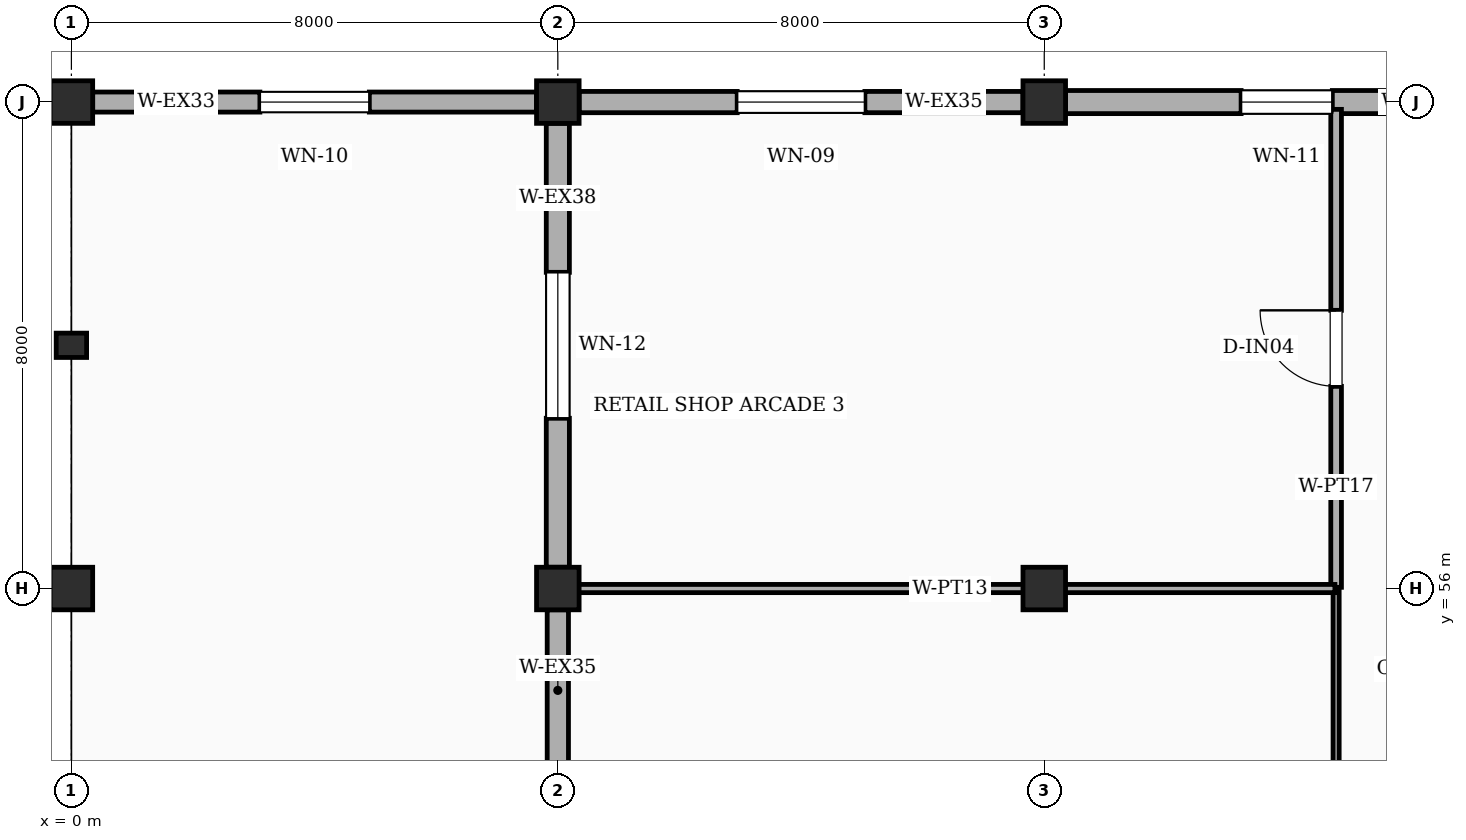
"""IFC4 building model, lengths in metres.
Left out: names, types, materials, properties, quantities, classifications, styles, units other than length and angle.
Written with IfcOpenShell. Run it as: python <this file> out.ifc"""

import sys

from ifc_helpers import new_model, si_unit, direction, frame, frame_2d, origin, origin_2d, place, context, subcontext, project, spatial, rectangle, circle, extrude, element, fill, save


model = new_model("IFC4")
c1 = context("Model", 3, precision=1e-05, world=origin(), true_north=direction((0.0, 1.0)))
c2 = subcontext(c1, "Body", "Model", "MODEL_VIEW")
j1 = project(units=[si_unit("LENGTHUNIT", "METRE"), si_unit("PLANEANGLEUNIT", "RADIAN")], contexts=[c1])
p1 = place(None, origin())
s1 = spatial("IfcSite", under=j1, at=p1, CompositionType="ELEMENT")
p2 = place(p1, origin())
s2 = spatial("IfcBuilding", under=s1, at=p2, CompositionType="ELEMENT")
p3 = place(p2, origin())
s3 = spatial("IfcBuildingStorey", under=s2, at=p3, CompositionType="ELEMENT", Elevation=0.0)
for number, where, z_axis, x_axis in (
    (1, (0.0, 56.0, 0.0), (0.0, 0.0, 1.0), (1.0, 0.0, 0.0)),
    (2, (0.0, 64.0, 0.0), (0.0, 0.0, 1.0), (1.0, 0.0, 0.0)),
):
    element("IfcColumn", number, at=place(p3, frame(where, z_axis=z_axis, x_axis=x_axis)), inside=s3, PredefinedType="COLUMN", context=c2, shape_type="SweptSolid", body=[
        extrude(circle(Radius=0.35, at=origin_2d()), origin(), (0.0, 0.0, 1.0), 5.4),
    ])
for number, where, z_axis, x_axis in (
    (3, (8.0, 56.0, 0.0), (0.0, 0.0, 1.0), (1.0, 0.0, 0.0)),
    (4, (8.0, 64.0, 0.0), (0.0, 0.0, 1.0), (1.0, 0.0, 0.0)),
    (5, (16.0, 56.0, 0.0), (0.0, 0.0, 1.0), (1.0, 0.0, 0.0)),
    (6, (16.0, 64.0, 0.0), (0.0, 0.0, 1.0), (1.0, 0.0, 0.0)),
):
    element("IfcColumn", number, at=place(p3, frame(where, z_axis=z_axis, x_axis=x_axis)), inside=s3, PredefinedType="COLUMN", context=c2, shape_type="SweptSolid", body=[
        extrude(rectangle(XDim=0.7, YDim=0.7, at=origin_2d()), origin(), (0.0, 0.0, 1.0), 5.4),
    ])
p4 = place(p3, frame((0.0, 60.0, 0.0), z_axis=(0.0, 0.0, 1.0), x_axis=(1.0, 0.0, 0.0)))
e7 = element("IfcColumn", 7, at=p4, inside=s3, PredefinedType="PILASTER", context=c2, shape_type="SweptSolid", body=[
    extrude(rectangle(XDim=0.5, YDim=0.4, at=origin_2d()), origin(), (0.0, 0.0, 1.0), 5.4),
])
p5 = place(p3, frame((8.0, 63.65, 0.0), z_axis=(0.0, 0.0, 1.0), x_axis=(0.0, -1.0, 0.0)))
e8 = element("IfcWall", 8, at=p5, inside=s3, PredefinedType="STANDARD", context=c2, shape_type="SweptSolid", body=[
    extrude(rectangle(XDim=7.3, YDim=0.38, at=frame_2d((3.65, 0.0))), origin(), (0.0, 0.0, 1.0), 4.42),
])
p6 = place(p5, frame((2.45, 0.0, 0.95)))
e9 = element("IfcOpeningElement", 9, at=p6, cuts=e8, PredefinedType="OPENING", context=c2, shape_type="SweptSolid", body=[
    extrude(rectangle(XDim=2.4, YDim=1.85, at=frame_2d((1.2, 0.925))), frame((0.0, 0.2, 0.0), z_axis=(0.0, -1.0, 0.0), x_axis=(1.0, 0.0, 0.0)), (0.0, 0.0, 1.0), 0.4),
])
p7 = place(p3, frame((8.0, 55.65, 0.0), z_axis=(0.0, 0.0, 1.0), x_axis=(0.0, -1.0, 0.0)))
e10 = element("IfcWall", 10, at=p7, inside=s3, PredefinedType="STANDARD", context=c2, shape_type="SweptSolid", body=[
    extrude(rectangle(XDim=7.3, YDim=0.35, at=frame_2d((3.65, 0.0))), origin(), (0.0, 0.0, 1.0), 4.42),
])
p8 = place(p7, frame((2.65, 0.0, 0.0)))
e11 = element("IfcOpeningElement", 11, at=p8, cuts=e10, PredefinedType="OPENING", context=c2, shape_type="SweptSolid", body=[
    extrude(rectangle(XDim=2.0, YDim=2.4, at=frame_2d((1.0, 1.2))), frame((0.0, 0.185, 0.0), z_axis=(0.0, -1.0, 0.0), x_axis=(1.0, 0.0, 0.0)), (0.0, 0.0, 1.0), 0.37),
])
p9 = place(p3, frame((23.625, 64.0, 0.0), z_axis=(0.0, 0.0, 1.0), x_axis=(-1.0, 0.0, 0.0)))
e12 = element("IfcWall", 12, at=p9, inside=s3, PredefinedType="STANDARD", context=c2, shape_type="SweptSolid", body=[
    extrude(rectangle(XDim=7.275, YDim=0.38, at=frame_2d((3.637, 0.0))), origin(), (0.0, 0.0, 1.0), 5.1),
])
p10 = place(p9, frame((2.887, 0.0, 0.95)))
e13 = element("IfcOpeningElement", 13, at=p10, cuts=e12, PredefinedType="OPENING", context=c2, shape_type="SweptSolid", body=[
    extrude(rectangle(XDim=1.5, YDim=1.8, at=frame_2d((0.75, 0.9))), frame((0.0, 0.2, 0.0), z_axis=(0.0, -1.0, 0.0), x_axis=(1.0, 0.0, 0.0)), (0.0, 0.0, 1.0), 0.4),
])
p11 = place(p3, frame((15.65, 64.0, 0.0), z_axis=(0.0, 0.0, 1.0), x_axis=(-1.0, 0.0, 0.0)))
e14 = element("IfcWall", 14, at=p11, inside=s3, PredefinedType="STANDARD", context=c2, shape_type="SweptSolid", body=[
    extrude(rectangle(XDim=7.3, YDim=0.35, at=frame_2d((3.65, 0.0))), origin(), (0.0, 0.0, 1.0), 5.1),
])
p12 = place(p11, frame((2.6, 0.0, 0.95)))
e15 = element("IfcOpeningElement", 15, at=p12, cuts=e14, PredefinedType="OPENING", context=c2, shape_type="SweptSolid", body=[
    extrude(rectangle(XDim=2.1, YDim=2.0, at=frame_2d((1.05, 1.0))), frame((0.0, 0.185, 0.0), z_axis=(0.0, -1.0, 0.0), x_axis=(1.0, 0.0, 0.0)), (0.0, 0.0, 1.0), 0.37),
])
p13 = place(p3, frame((7.65, 64.0, 0.0), z_axis=(0.0, 0.0, 1.0), x_axis=(-1.0, 0.0, 0.0)))
e16 = element("IfcWall", 16, at=p13, inside=s3, PredefinedType="STANDARD", context=c2, shape_type="SweptSolid", body=[
    extrude(rectangle(XDim=7.3, YDim=0.33, at=frame_2d((3.65, 0.0))), origin(), (0.0, 0.0, 1.0), 5.1),
])
p14 = place(p13, frame((2.75, 0.0, 0.95)))
e17 = element("IfcOpeningElement", 17, at=p14, cuts=e16, PredefinedType="OPENING", context=c2, shape_type="SweptSolid", body=[
    extrude(rectangle(XDim=1.8, YDim=2.0, at=frame_2d((0.9, 1.0))), frame((0.0, 0.175, 0.0), z_axis=(0.0, -1.0, 0.0), x_axis=(1.0, 0.0, 0.0)), (0.0, 0.0, 1.0), 0.35),
])
p15 = place(p3, frame((20.8, 40.02, 0.0), z_axis=(0.0, 0.0, 1.0), x_axis=(0.0, 1.0, 0.0)))
e18 = element("IfcWall", 18, at=p15, inside=s3, PredefinedType="PARTITIONING", context=c2, shape_type="SweptSolid", body=[
    extrude(rectangle(XDim=15.96, YDim=0.1, at=frame_2d((7.98, 0.0))), origin(), (0.0, 0.0, 1.0), 4.27),
])
p16 = place(p15, frame((7.155, 0.0, 0.0)))
e19 = element("IfcOpeningElement", 19, at=p16, cuts=e18, PredefinedType="OPENING", context=c2, shape_type="SweptSolid", body=[
    extrude(rectangle(XDim=1.65, YDim=2.25, at=frame_2d((0.825, 1.125))), frame((0.0, 0.06, 0.0), z_axis=(0.0, -1.0, 0.0), x_axis=(1.0, 0.0, 0.0)), (0.0, 0.0, 1.0), 0.12),
])
p17 = place(p3, frame((20.8, 56.02, 0.0), z_axis=(0.0, 0.0, 1.0), x_axis=(0.0, 1.0, 0.0)))
e20 = element("IfcWall", 20, at=p17, inside=s3, PredefinedType="PARTITIONING", context=c2, shape_type="SweptSolid", body=[
    extrude(rectangle(XDim=7.86, YDim=0.175, at=frame_2d((3.93, 0.0))), origin(), (0.0, 0.0, 1.0), 4.27),
])
p18 = place(p17, frame((3.305, 0.0, 0.0)))
e21 = element("IfcOpeningElement", 21, at=p18, cuts=e20, PredefinedType="OPENING", context=c2, shape_type="SweptSolid", body=[
    extrude(rectangle(XDim=1.25, YDim=2.15, at=frame_2d((0.625, 1.075))), frame((0.0, 0.097, 0.0), z_axis=(0.0, -1.0, 0.0), x_axis=(1.0, 0.0, 0.0)), (0.0, 0.0, 1.0), 0.195),
])
p19 = place(p3, frame((8.12, 56.0, 0.0), z_axis=(0.0, 0.0, 1.0), x_axis=(1.0, 0.0, 0.0)))
e22 = element("IfcWall", 22, at=p19, inside=s3, PredefinedType="PARTITIONING", context=c2, shape_type="SweptSolid", body=[
    extrude(rectangle(XDim=12.66, YDim=0.135, at=frame_2d((6.33, 0.0))), origin(), (0.0, 0.0, 1.0), 4.27),
])
p20 = place(p6, origin())
e23 = element("IfcWindow", 23, at=p20, inside=s3, PartitioningType="SINGLE_PANEL", PredefinedType="WINDOW", context=c2, shape_type="SweptSolid", body=[
    extrude(rectangle(XDim=2.4, YDim=1.85, at=frame_2d((1.2, 0.925))), frame((0.0, 0.03, 0.0), z_axis=(0.0, -1.0, 0.0), x_axis=(1.0, 0.0, 0.0)), (0.0, 0.0, 1.0), 0.06),
])
fill(e9, e23)
p21 = place(p10, origin())
e24 = element("IfcWindow", 24, at=p21, inside=s3, PartitioningType="SINGLE_PANEL", PredefinedType="WINDOW", context=c2, shape_type="SweptSolid", body=[
    extrude(rectangle(XDim=1.5, YDim=1.8, at=frame_2d((0.75, 0.9))), frame((0.0, 0.03, 0.0), z_axis=(0.0, -1.0, 0.0), x_axis=(1.0, 0.0, 0.0)), (0.0, 0.0, 1.0), 0.06),
])
fill(e13, e24)
p22 = place(p12, origin())
e25 = element("IfcWindow", 25, at=p22, inside=s3, PartitioningType="SINGLE_PANEL", PredefinedType="WINDOW", context=c2, shape_type="SweptSolid", body=[
    extrude(rectangle(XDim=2.1, YDim=2.0, at=frame_2d((1.05, 1.0))), frame((0.0, 0.03, 0.0), z_axis=(0.0, -1.0, 0.0), x_axis=(1.0, 0.0, 0.0)), (0.0, 0.0, 1.0), 0.06),
])
fill(e15, e25)
p23 = place(p14, origin())
e26 = element("IfcWindow", 26, at=p23, inside=s3, PartitioningType="SINGLE_PANEL", PredefinedType="WINDOW", context=c2, shape_type="SweptSolid", body=[
    extrude(rectangle(XDim=1.8, YDim=2.0, at=frame_2d((0.9, 1.0))), frame((0.0, 0.03, 0.0), z_axis=(0.0, -1.0, 0.0), x_axis=(1.0, 0.0, 0.0)), (0.0, 0.0, 1.0), 0.06),
])
fill(e17, e26)
p24 = place(p18, origin())
e27 = element("IfcDoor", 27, at=p24, inside=s3, OperationType="SINGLE_SWING_RIGHT", PredefinedType="DOOR", context=c2, shape_type="SweptSolid", body=[
    extrude(rectangle(XDim=1.25, YDim=2.15, at=frame_2d((0.625, 1.075))), frame((0.0, 0.025, 0.0), z_axis=(0.0, -1.0, 0.0), x_axis=(1.0, 0.0, 0.0)), (0.0, 0.0, 1.0), 0.05),
])
fill(e21, e27)
save(model, sys.argv[1])
